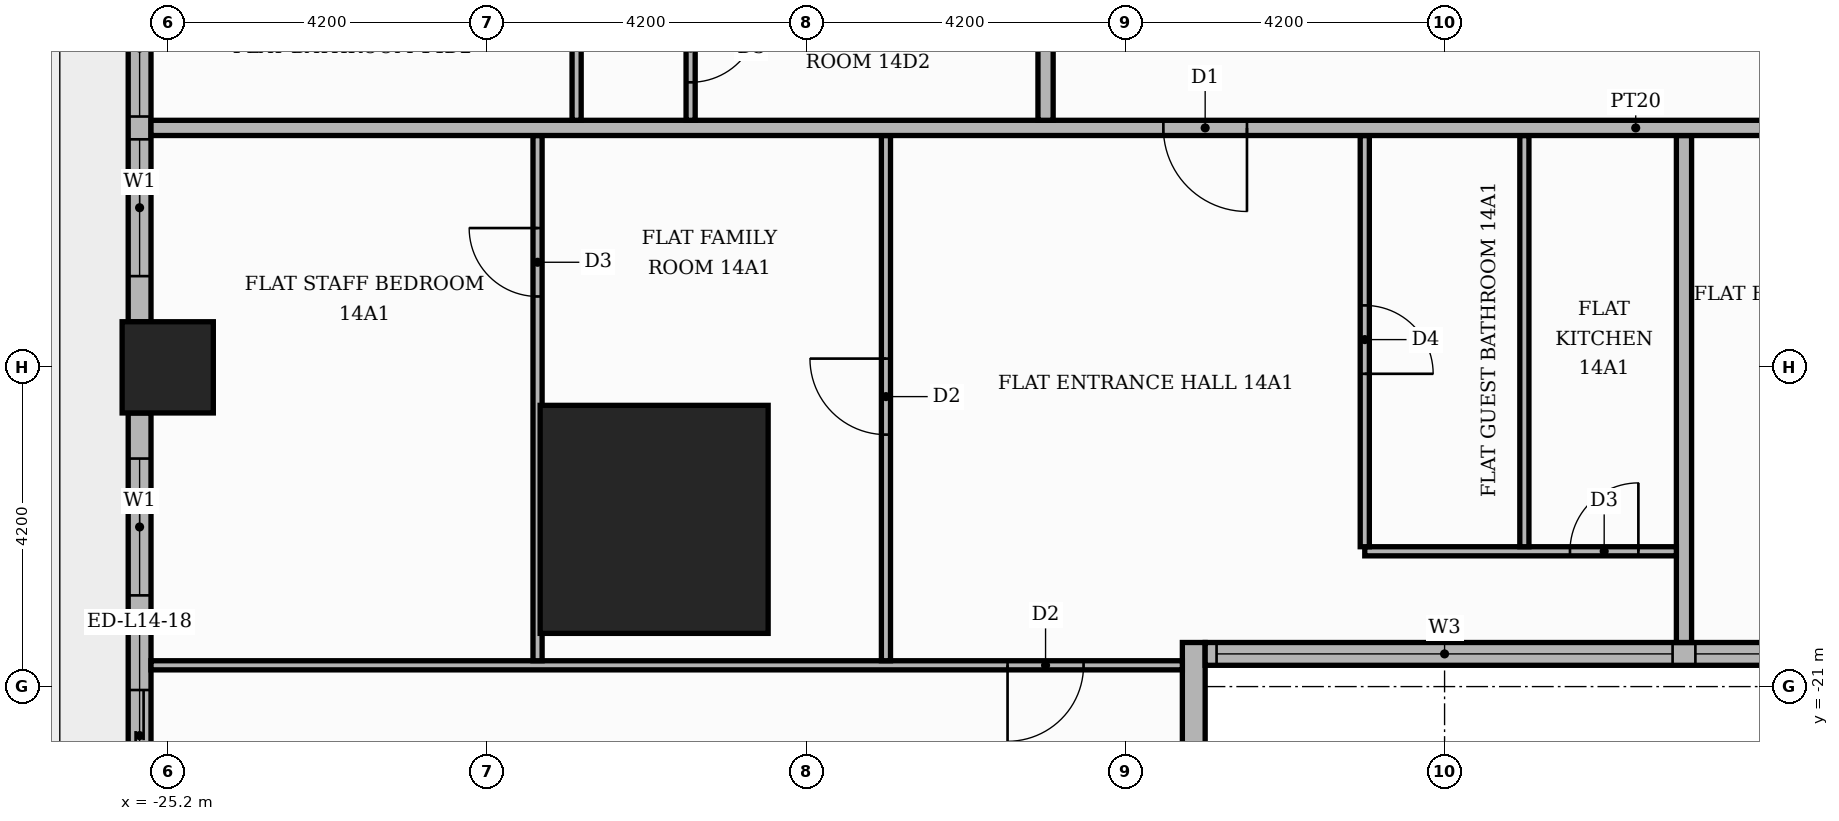
"""IFC4 building model, lengths in metres.
Left out: names, types, materials, properties, quantities, classifications, styles, units other than length and angle.
Written with IfcOpenShell. Run it as: python <this file> out.ifc"""

import sys

from ifc_helpers import new_model, si_unit, direction, frame, frame_2d, origin, origin_2d, place, context, subcontext, project, spatial, rectangle, extrude, element, fill, save


model = new_model("IFC4")
c1 = context("Model", 3, precision=1e-05, world=origin(), true_north=direction((0.0, 1.0)))
c2 = subcontext(c1, "Body", "Model", "MODEL_VIEW")
j1 = project(units=[si_unit("LENGTHUNIT", "METRE"), si_unit("PLANEANGLEUNIT", "RADIAN")], contexts=[c1])
p1 = place(None, origin())
s1 = spatial("IfcSite", under=j1, at=p1, CompositionType="ELEMENT")
p2 = place(p1, origin())
s2 = spatial("IfcBuilding", under=s1, at=p2, CompositionType="ELEMENT")
p3 = place(p2, frame((0.0, 0.0, 62.1)))
s3 = spatial("IfcBuildingStorey", under=s2, at=p3, CompositionType="ELEMENT", Elevation=62.1)
p4 = place(p3, frame((-18.8, -18.8, 0.0), z_axis=(0.0, 0.0, 1.0), x_axis=(1.0, 0.0, 0.0)))
e1 = element("IfcColumn", 1, at=p4, inside=s3, PredefinedType="COLUMN", context=c2, shape_type="SweptSolid", body=[
    extrude(rectangle(XDim=3.0, YDim=3.0, at=origin_2d()), origin(), (0.0, 0.0, 1.0), 3.9),
])
p5 = place(p3, frame((-25.2, -16.8, 0.0), z_axis=(0.0, 0.0, 1.0), x_axis=(1.0, 0.0, 0.0)))
e2 = element("IfcColumn", 2, at=p5, inside=s3, PredefinedType="COLUMN", context=c2, shape_type="SweptSolid", body=[
    extrude(rectangle(XDim=1.2, YDim=1.2, at=origin_2d()), origin(), (0.0, 0.0, 1.0), 3.9),
])
p6 = place(p3, frame((-25.57, -9.0, 0.0), z_axis=(0.0, 0.0, 1.0), x_axis=(0.0, -1.0, 0.0)))
e3 = element("IfcWall", 3, at=p6, inside=s3, PredefinedType="STANDARD", context=c2, shape_type="SweptSolid", body=[
    extrude(rectangle(XDim=7.2, YDim=0.3, at=frame_2d((3.6, 0.0))), origin(), (0.0, 0.0, 1.0), 3.48),
])
p7 = place(p6, frame((0.6, 0.0, 0.9)))
e4 = element("IfcOpeningElement", 4, at=p7, cuts=e3, PredefinedType="OPENING", context=c2, shape_type="SweptSolid", body=[
    extrude(rectangle(XDim=1.8, YDim=2.1, at=frame_2d((0.9, 1.05))), frame((0.0, 0.16, 0.0), z_axis=(0.0, -1.0, 0.0), x_axis=(1.0, 0.0, 0.0)), (0.0, 0.0, 1.0), 0.32),
])
p8 = place(p6, frame((2.7, 0.0, 0.9)))
e5 = element("IfcOpeningElement", 5, at=p8, cuts=e3, PredefinedType="OPENING", context=c2, shape_type="SweptSolid", body=[
    extrude(rectangle(XDim=1.8, YDim=2.1, at=frame_2d((0.9, 1.05))), frame((0.0, 0.16, 0.0), z_axis=(0.0, -1.0, 0.0), x_axis=(1.0, 0.0, 0.0)), (0.0, 0.0, 1.0), 0.32),
])
p9 = place(p6, frame((4.8, 0.0, 0.9)))
e6 = element("IfcOpeningElement", 6, at=p9, cuts=e3, PredefinedType="OPENING", context=c2, shape_type="SweptSolid", body=[
    extrude(rectangle(XDim=1.8, YDim=2.1, at=frame_2d((0.9, 1.05))), frame((0.0, 0.16, 0.0), z_axis=(0.0, -1.0, 0.0), x_axis=(1.0, 0.0, 0.0)), (0.0, 0.0, 1.0), 0.32),
])
p10 = place(p3, frame((-25.57, -17.4, 0.0), z_axis=(0.0, 0.0, 1.0), x_axis=(0.0, -1.0, 0.0)))
e7 = element("IfcWall", 7, at=p10, inside=s3, PredefinedType="STANDARD", context=c2, shape_type="SweptSolid", body=[
    extrude(rectangle(XDim=5.32, YDim=0.3, at=frame_2d((2.66, 0.0))), origin(), (0.0, 0.0, 1.0), 3.48),
])
p11 = place(p10, frame((0.6, 0.0, 0.9)))
e8 = element("IfcOpeningElement", 8, at=p11, cuts=e7, PredefinedType="OPENING", context=c2, shape_type="SweptSolid", body=[
    extrude(rectangle(XDim=1.8, YDim=2.1, at=frame_2d((0.9, 1.05))), frame((0.0, 0.16, 0.0), z_axis=(0.0, -1.0, 0.0), x_axis=(1.0, 0.0, 0.0)), (0.0, 0.0, 1.0), 0.32),
])
p12 = place(p10, frame((3.645, 0.0, 0.0)))
e9 = element("IfcOpeningElement", 9, at=p12, cuts=e7, PredefinedType="OPENING", context=c2, shape_type="SweptSolid", body=[
    extrude(rectangle(XDim=1.2, YDim=2.4, at=frame_2d((0.6, 1.2))), frame((0.0, 0.16, 0.0), z_axis=(0.0, -1.0, 0.0), x_axis=(1.0, 0.0, 0.0)), (0.0, 0.0, 1.0), 0.32),
])
p13 = place(p3, frame((-11.7, -25.42, 0.0), z_axis=(0.0, 0.0, 1.0), x_axis=(0.0, 1.0, 0.0)))
e10 = element("IfcWall", 10, at=p13, inside=s3, PredefinedType="STANDARD", context=c2, shape_type="SweptSolid", body=[
    extrude(rectangle(XDim=5.0, YDim=0.3, at=frame_2d((2.5, 0.0))), origin(), (0.0, 0.0, 1.0), 3.48),
])
p14 = place(p13, frame((1.42, 0.0, 0.9)))
e11 = element("IfcOpeningElement", 11, at=p14, cuts=e10, PredefinedType="OPENING", context=c2, shape_type="SweptSolid", body=[
    extrude(rectangle(XDim=1.8, YDim=2.1, at=frame_2d((0.9, 1.05))), frame((0.0, 0.16, 0.0), z_axis=(0.0, -1.0, 0.0), x_axis=(1.0, 0.0, 0.0)), (0.0, 0.0, 1.0), 0.32),
])
p15 = place(p3, frame((-11.55, -20.57, 0.0), z_axis=(0.0, 0.0, 1.0), x_axis=(1.0, 0.0, 0.0)))
e12 = element("IfcWall", 12, at=p15, inside=s3, PredefinedType="STANDARD", context=c2, shape_type="SweptSolid", body=[
    extrude(rectangle(XDim=23.4, YDim=0.3, at=frame_2d((11.7, 0.0))), origin(), (0.0, 0.0, 1.0), 3.48),
])
p16 = place(p15, frame((0.15, 0.0, 0.9)))
e13 = element("IfcOpeningElement", 13, at=p16, cuts=e12, PredefinedType="OPENING", context=c2, shape_type="SweptSolid", body=[
    extrude(rectangle(XDim=6.0, YDim=2.1, at=frame_2d((3.0, 1.05))), frame((0.0, 0.16, 0.0), z_axis=(0.0, -1.0, 0.0), x_axis=(1.0, 0.0, 0.0)), (0.0, 0.0, 1.0), 0.32),
])
p17 = place(p15, frame((6.45, 0.0, 0.9)))
e14 = element("IfcOpeningElement", 14, at=p17, cuts=e12, PredefinedType="OPENING", context=c2, shape_type="SweptSolid", body=[
    extrude(rectangle(XDim=6.0, YDim=2.1, at=frame_2d((3.0, 1.05))), frame((0.0, 0.16, 0.0), z_axis=(0.0, -1.0, 0.0), x_axis=(1.0, 0.0, 0.0)), (0.0, 0.0, 1.0), 0.32),
])
p18 = place(p15, frame((12.75, 0.0, 0.9)))
e15 = element("IfcOpeningElement", 15, at=p18, cuts=e12, PredefinedType="OPENING", context=c2, shape_type="SweptSolid", body=[
    extrude(rectangle(XDim=6.0, YDim=2.1, at=frame_2d((3.0, 1.05))), frame((0.0, 0.16, 0.0), z_axis=(0.0, -1.0, 0.0), x_axis=(1.0, 0.0, 0.0)), (0.0, 0.0, 1.0), 0.32),
])
p19 = place(p15, frame((19.05, 0.0, 0.9)))
e16 = element("IfcOpeningElement", 16, at=p19, cuts=e12, PredefinedType="OPENING", context=c2, shape_type="SweptSolid", body=[
    extrude(rectangle(XDim=3.9, YDim=2.1, at=frame_2d((1.95, 1.05))), frame((0.0, 0.16, 0.0), z_axis=(0.0, -1.0, 0.0), x_axis=(1.0, 0.0, 0.0)), (0.0, 0.0, 1.0), 0.32),
])
p20 = place(p3, frame((-25.42, -20.72, 0.0), z_axis=(0.0, 0.0, 1.0), x_axis=(1.0, 0.0, 0.0)))
e17 = element("IfcWall", 17, at=p20, inside=s3, PredefinedType="PARTITIONING", context=c2, shape_type="SweptSolid", body=[
    extrude(rectangle(XDim=13.57, YDim=0.12, at=frame_2d((6.785, 0.0))), origin(), (0.0, 0.0, 1.0), 3.48),
])
p21 = place(p20, frame((11.27, 0.0, 0.0)))
e18 = element("IfcOpeningElement", 18, at=p21, cuts=e17, PredefinedType="OPENING", context=c2, shape_type="SweptSolid", body=[
    extrude(rectangle(XDim=1.0, YDim=2.1, at=frame_2d((0.5, 1.05))), frame((0.0, 0.07, 0.0), z_axis=(0.0, -1.0, 0.0), x_axis=(1.0, 0.0, 0.0)), (0.0, 0.0, 1.0), 0.14),
])
p22 = place(p3, frame((-5.25, -20.42, 0.0), z_axis=(0.0, 0.0, 1.0), x_axis=(0.0, 1.0, 0.0)))
e19 = element("IfcWall", 19, at=p22, inside=s3, PredefinedType="PARTITIONING", context=c2, shape_type="SweptSolid", body=[
    extrude(rectangle(XDim=6.67, YDim=0.2, at=frame_2d((3.335, 0.0))), origin(), (0.0, 0.0, 1.0), 3.48),
])
p23 = place(p3, frame((-20.334, -20.66, 0.0), z_axis=(0.0, 0.0, 1.0), x_axis=(0.0, 1.0, 0.0)))
e20 = element("IfcWall", 20, at=p23, inside=s3, PredefinedType="PARTITIONING", context=c2, shape_type="SweptSolid", body=[
    extrude(rectangle(XDim=6.91, YDim=0.12, at=frame_2d((3.455, 0.0))), origin(), (0.0, 0.0, 1.0), 3.48),
])
p24 = place(p23, frame((4.792, 0.0, 0.0)))
e21 = element("IfcOpeningElement", 21, at=p24, cuts=e20, PredefinedType="OPENING", context=c2, shape_type="SweptSolid", body=[
    extrude(rectangle(XDim=0.9, YDim=2.1, at=frame_2d((0.45, 1.05))), frame((0.0, 0.07, 0.0), z_axis=(0.0, -1.0, 0.0), x_axis=(1.0, 0.0, 0.0)), (0.0, 0.0, 1.0), 0.14),
])
p25 = place(p3, frame((-15.75, -20.66, 0.0), z_axis=(0.0, 0.0, 1.0), x_axis=(0.0, 1.0, 0.0)))
e22 = element("IfcWall", 22, at=p25, inside=s3, PredefinedType="PARTITIONING", context=c2, shape_type="SweptSolid", body=[
    extrude(rectangle(XDim=6.91, YDim=0.12, at=frame_2d((3.455, 0.0))), origin(), (0.0, 0.0, 1.0), 3.48),
])
p26 = place(p25, frame((2.975, 0.0, 0.0)))
e23 = element("IfcOpeningElement", 23, at=p26, cuts=e22, PredefinedType="OPENING", context=c2, shape_type="SweptSolid", body=[
    extrude(rectangle(XDim=1.0, YDim=2.1, at=frame_2d((0.5, 1.05))), frame((0.0, 0.07, 0.0), z_axis=(0.0, -1.0, 0.0), x_axis=(1.0, 0.0, 0.0)), (0.0, 0.0, 1.0), 0.14),
])
p27 = place(p3, frame((-9.45, -19.22, 0.0), z_axis=(0.0, 0.0, 1.0), x_axis=(1.0, 0.0, 0.0)))
e24 = element("IfcWall", 24, at=p27, inside=s3, PredefinedType="PARTITIONING", context=c2, shape_type="SweptSolid", body=[
    extrude(rectangle(XDim=4.1, YDim=0.12, at=frame_2d((2.05, 0.0))), origin(), (0.0, 0.0, 1.0), 3.48),
])
p28 = place(p27, frame((2.7, 0.0, 0.0)))
e25 = element("IfcOpeningElement", 25, at=p28, cuts=e24, PredefinedType="OPENING", context=c2, shape_type="SweptSolid", body=[
    extrude(rectangle(XDim=0.9, YDim=2.1, at=frame_2d((0.45, 1.05))), frame((0.0, 0.07, 0.0), z_axis=(0.0, -1.0, 0.0), x_axis=(1.0, 0.0, 0.0)), (0.0, 0.0, 1.0), 0.14),
])
p29 = place(p3, frame((-9.45, -19.16, 0.0), z_axis=(0.0, 0.0, 1.0), x_axis=(0.0, 1.0, 0.0)))
e26 = element("IfcWall", 26, at=p29, inside=s3, PredefinedType="PARTITIONING", context=c2, shape_type="SweptSolid", body=[
    extrude(rectangle(XDim=5.41, YDim=0.12, at=frame_2d((2.705, 0.0))), origin(), (0.0, 0.0, 1.0), 3.48),
])
p30 = place(p29, frame((2.275, 0.0, 0.0)))
e27 = element("IfcOpeningElement", 27, at=p30, cuts=e26, PredefinedType="OPENING", context=c2, shape_type="SweptSolid", body=[
    extrude(rectangle(XDim=0.9, YDim=2.1, at=frame_2d((0.45, 1.05))), frame((0.0, 0.07, 0.0), z_axis=(0.0, -1.0, 0.0), x_axis=(1.0, 0.0, 0.0)), (0.0, 0.0, 1.0), 0.14),
])
p31 = place(p3, frame((-7.35, -19.16, 0.0), z_axis=(0.0, 0.0, 1.0), x_axis=(0.0, 1.0, 0.0)))
e28 = element("IfcWall", 28, at=p31, inside=s3, PredefinedType="PARTITIONING", context=c2, shape_type="SweptSolid", body=[
    extrude(rectangle(XDim=5.41, YDim=0.12, at=frame_2d((2.705, 0.0))), origin(), (0.0, 0.0, 1.0), 3.48),
])
p32 = place(p3, frame((-25.42, -13.65, 0.0), z_axis=(0.0, 0.0, 1.0), x_axis=(1.0, 0.0, 0.0)))
e29 = element("IfcWall", 29, at=p32, inside=s3, PredefinedType="PARTITIONING", context=c2, shape_type="SweptSolid", body=[
    extrude(rectangle(XDim=39.07, YDim=0.2, at=frame_2d((19.535, 0.0))), origin(), (0.0, 0.0, 1.0), 3.48),
])
p33 = place(p32, frame((13.32, 0.0, 0.0)))
e30 = element("IfcOpeningElement", 30, at=p33, cuts=e29, PredefinedType="OPENING", context=c2, shape_type="SweptSolid", body=[
    extrude(rectangle(XDim=1.1, YDim=2.4, at=frame_2d((0.55, 1.2))), frame((0.0, 0.11, 0.0), z_axis=(0.0, -1.0, 0.0), x_axis=(1.0, 0.0, 0.0)), (0.0, 0.0, 1.0), 0.22),
])
p34 = place(p32, frame((21.72, 0.0, 0.0)))
e31 = element("IfcOpeningElement", 31, at=p34, cuts=e29, PredefinedType="OPENING", context=c2, shape_type="SweptSolid", body=[
    extrude(rectangle(XDim=1.1, YDim=2.4, at=frame_2d((0.55, 1.2))), frame((0.0, 0.11, 0.0), z_axis=(0.0, -1.0, 0.0), x_axis=(1.0, 0.0, 0.0)), (0.0, 0.0, 1.0), 0.22),
])
p35 = place(p3, frame((-19.82, -13.55, 0.0), z_axis=(0.0, 0.0, 1.0), x_axis=(0.0, 1.0, 0.0)))
e32 = element("IfcWall", 32, at=p35, inside=s3, PredefinedType="PARTITIONING", context=c2, shape_type="SweptSolid", body=[
    extrude(rectangle(XDim=1.94, YDim=0.12, at=frame_2d((0.97, 0.0))), origin(), (0.0, 0.0, 1.0), 3.48),
])
p36 = place(p3, frame((-18.32, -13.55, 0.0), z_axis=(0.0, 0.0, 1.0), x_axis=(0.0, 1.0, 0.0)))
e33 = element("IfcWall", 33, at=p36, inside=s3, PredefinedType="PARTITIONING", context=c2, shape_type="SweptSolid", body=[
    extrude(rectangle(XDim=1.94, YDim=0.12, at=frame_2d((0.97, 0.0))), origin(), (0.0, 0.0, 1.0), 3.48),
])
p37 = place(p36, frame((0.5, 0.0, 0.0)))
e34 = element("IfcOpeningElement", 34, at=p37, cuts=e33, PredefinedType="OPENING", context=c2, shape_type="SweptSolid", body=[
    extrude(rectangle(XDim=0.9, YDim=2.1, at=frame_2d((0.45, 1.05))), frame((0.0, 0.07, 0.0), z_axis=(0.0, -1.0, 0.0), x_axis=(1.0, 0.0, 0.0)), (0.0, 0.0, 1.0), 0.14),
])
p38 = place(p3, frame((-13.65, -13.55, 0.0), z_axis=(0.0, 0.0, 1.0), x_axis=(0.0, 1.0, 0.0)))
e35 = element("IfcWall", 35, at=p38, inside=s3, PredefinedType="PARTITIONING", context=c2, shape_type="SweptSolid", body=[
    extrude(rectangle(XDim=18.7, YDim=0.2, at=frame_2d((9.35, 0.0))), origin(), (0.0, 0.0, 1.0), 3.48),
])
p39 = place(p38, frame((11.95, 0.0, 0.0)))
e36 = element("IfcOpeningElement", 36, at=p39, cuts=e35, PredefinedType="OPENING", context=c2, shape_type="SweptSolid", body=[
    extrude(rectangle(XDim=1.1, YDim=2.4, at=frame_2d((0.55, 1.2))), frame((0.0, 0.11, 0.0), z_axis=(0.0, -1.0, 0.0), x_axis=(1.0, 0.0, 0.0)), (0.0, 0.0, 1.0), 0.22),
])
p40 = place(p8, origin())
e37 = element("IfcWindow", 37, at=p40, inside=s3, PartitioningType="SINGLE_PANEL", PredefinedType="WINDOW", context=c2, shape_type="SweptSolid", body=[
    extrude(rectangle(XDim=1.8, YDim=2.1, at=frame_2d((0.9, 1.05))), frame((0.0, 0.03, 0.0), z_axis=(0.0, -1.0, 0.0), x_axis=(1.0, 0.0, 0.0)), (0.0, 0.0, 1.0), 0.06),
])
fill(e5, e37)
p41 = place(p9, origin())
e38 = element("IfcWindow", 38, at=p41, inside=s3, PartitioningType="SINGLE_PANEL", PredefinedType="WINDOW", context=c2, shape_type="SweptSolid", body=[
    extrude(rectangle(XDim=1.8, YDim=2.1, at=frame_2d((0.9, 1.05))), frame((0.0, 0.03, 0.0), z_axis=(0.0, -1.0, 0.0), x_axis=(1.0, 0.0, 0.0)), (0.0, 0.0, 1.0), 0.06),
])
fill(e6, e38)
p42 = place(p11, origin())
e39 = element("IfcWindow", 39, at=p42, inside=s3, PartitioningType="SINGLE_PANEL", PredefinedType="WINDOW", context=c2, shape_type="SweptSolid", body=[
    extrude(rectangle(XDim=1.8, YDim=2.1, at=frame_2d((0.9, 1.05))), frame((0.0, 0.03, 0.0), z_axis=(0.0, -1.0, 0.0), x_axis=(1.0, 0.0, 0.0)), (0.0, 0.0, 1.0), 0.06),
])
fill(e8, e39)
p43 = place(p12, origin())
e40 = element("IfcDoor", 40, at=p43, inside=s3, OperationType="SLIDING_TO_RIGHT", PredefinedType="DOOR", context=c2, shape_type="SweptSolid", body=[
    extrude(rectangle(XDim=1.2, YDim=2.4, at=frame_2d((0.6, 1.2))), frame((0.0, 0.025, 0.0), z_axis=(0.0, -1.0, 0.0), x_axis=(1.0, 0.0, 0.0)), (0.0, 0.0, 1.0), 0.05),
])
fill(e9, e40)
p44 = place(p16, origin())
e41 = element("IfcWindow", 41, at=p44, inside=s3, PartitioningType="SINGLE_PANEL", PredefinedType="WINDOW", context=c2, shape_type="SweptSolid", body=[
    extrude(rectangle(XDim=6.0, YDim=2.1, at=frame_2d((3.0, 1.05))), frame((0.0, 0.03, 0.0), z_axis=(0.0, -1.0, 0.0), x_axis=(1.0, 0.0, 0.0)), (0.0, 0.0, 1.0), 0.06),
])
fill(e13, e41)
p45 = place(p17, origin())
e42 = element("IfcWindow", 42, at=p45, inside=s3, PartitioningType="SINGLE_PANEL", PredefinedType="WINDOW", context=c2, shape_type="SweptSolid", body=[
    extrude(rectangle(XDim=6.0, YDim=2.1, at=frame_2d((3.0, 1.05))), frame((0.0, 0.03, 0.0), z_axis=(0.0, -1.0, 0.0), x_axis=(1.0, 0.0, 0.0)), (0.0, 0.0, 1.0), 0.06),
])
fill(e14, e42)
p46 = place(p33, frame((1.1, 0.0, 0.0), z_axis=(0.0, 0.0, 1.0), x_axis=(-1.0, 0.0, 0.0)))
e43 = element("IfcDoor", 43, at=p46, inside=s3, OperationType="SINGLE_SWING_RIGHT", PredefinedType="DOOR", context=c2, shape_type="SweptSolid", body=[
    extrude(rectangle(XDim=1.1, YDim=2.4, at=frame_2d((0.55, 1.2))), frame((0.0, 0.025, 0.0), z_axis=(0.0, -1.0, 0.0), x_axis=(1.0, 0.0, 0.0)), (0.0, 0.0, 1.0), 0.05),
])
fill(e30, e43)
p47 = place(p24, origin())
e44 = element("IfcDoor", 44, at=p47, inside=s3, OperationType="SINGLE_SWING_RIGHT", PredefinedType="DOOR", context=c2, shape_type="SweptSolid", body=[
    extrude(rectangle(XDim=0.9, YDim=2.1, at=frame_2d((0.45, 1.05))), frame((0.0, 0.025, 0.0), z_axis=(0.0, -1.0, 0.0), x_axis=(1.0, 0.0, 0.0)), (0.0, 0.0, 1.0), 0.05),
])
fill(e21, e44)
p48 = place(p26, origin())
e45 = element("IfcDoor", 45, at=p48, inside=s3, OperationType="SINGLE_SWING_RIGHT", PredefinedType="DOOR", context=c2, shape_type="SweptSolid", body=[
    extrude(rectangle(XDim=1.0, YDim=2.1, at=frame_2d((0.5, 1.05))), frame((0.0, 0.025, 0.0), z_axis=(0.0, -1.0, 0.0), x_axis=(1.0, 0.0, 0.0)), (0.0, 0.0, 1.0), 0.05),
])
fill(e23, e45)
p49 = place(p30, frame((0.9, 0.0, 0.0), z_axis=(0.0, 0.0, 1.0), x_axis=(-1.0, 0.0, 0.0)))
e46 = element("IfcDoor", 46, at=p49, inside=s3, OperationType="SINGLE_SWING_LEFT", PredefinedType="DOOR", context=c2, shape_type="SweptSolid", body=[
    extrude(rectangle(XDim=0.9, YDim=2.1, at=frame_2d((0.45, 1.05))), frame((0.0, 0.025, 0.0), z_axis=(0.0, -1.0, 0.0), x_axis=(1.0, 0.0, 0.0)), (0.0, 0.0, 1.0), 0.05),
])
fill(e27, e46)
p50 = place(p28, origin())
e47 = element("IfcDoor", 47, at=p50, inside=s3, OperationType="SINGLE_SWING_RIGHT", PredefinedType="DOOR", context=c2, shape_type="SweptSolid", body=[
    extrude(rectangle(XDim=0.9, YDim=2.1, at=frame_2d((0.45, 1.05))), frame((0.0, 0.025, 0.0), z_axis=(0.0, -1.0, 0.0), x_axis=(1.0, 0.0, 0.0)), (0.0, 0.0, 1.0), 0.05),
])
fill(e25, e47)
p51 = place(p21, frame((1.0, 0.0, 0.0), z_axis=(0.0, 0.0, 1.0), x_axis=(-1.0, 0.0, 0.0)))
e48 = element("IfcDoor", 48, at=p51, inside=s3, OperationType="SINGLE_SWING_LEFT", PredefinedType="DOOR", context=c2, shape_type="SweptSolid", body=[
    extrude(rectangle(XDim=1.0, YDim=2.1, at=frame_2d((0.5, 1.05))), frame((0.0, 0.025, 0.0), z_axis=(0.0, -1.0, 0.0), x_axis=(1.0, 0.0, 0.0)), (0.0, 0.0, 1.0), 0.05),
])
fill(e18, e48)
p52 = place(p37, frame((0.9, 0.0, 0.0), z_axis=(0.0, 0.0, 1.0), x_axis=(-1.0, 0.0, 0.0)))
e49 = element("IfcDoor", 49, at=p52, inside=s3, OperationType="SINGLE_SWING_RIGHT", PredefinedType="DOOR", context=c2, shape_type="SweptSolid", body=[
    extrude(rectangle(XDim=0.9, YDim=2.1, at=frame_2d((0.45, 1.05))), frame((0.0, 0.025, 0.0), z_axis=(0.0, -1.0, 0.0), x_axis=(1.0, 0.0, 0.0)), (0.0, 0.0, 1.0), 0.05),
])
fill(e34, e49)
save(model, sys.argv[1])
